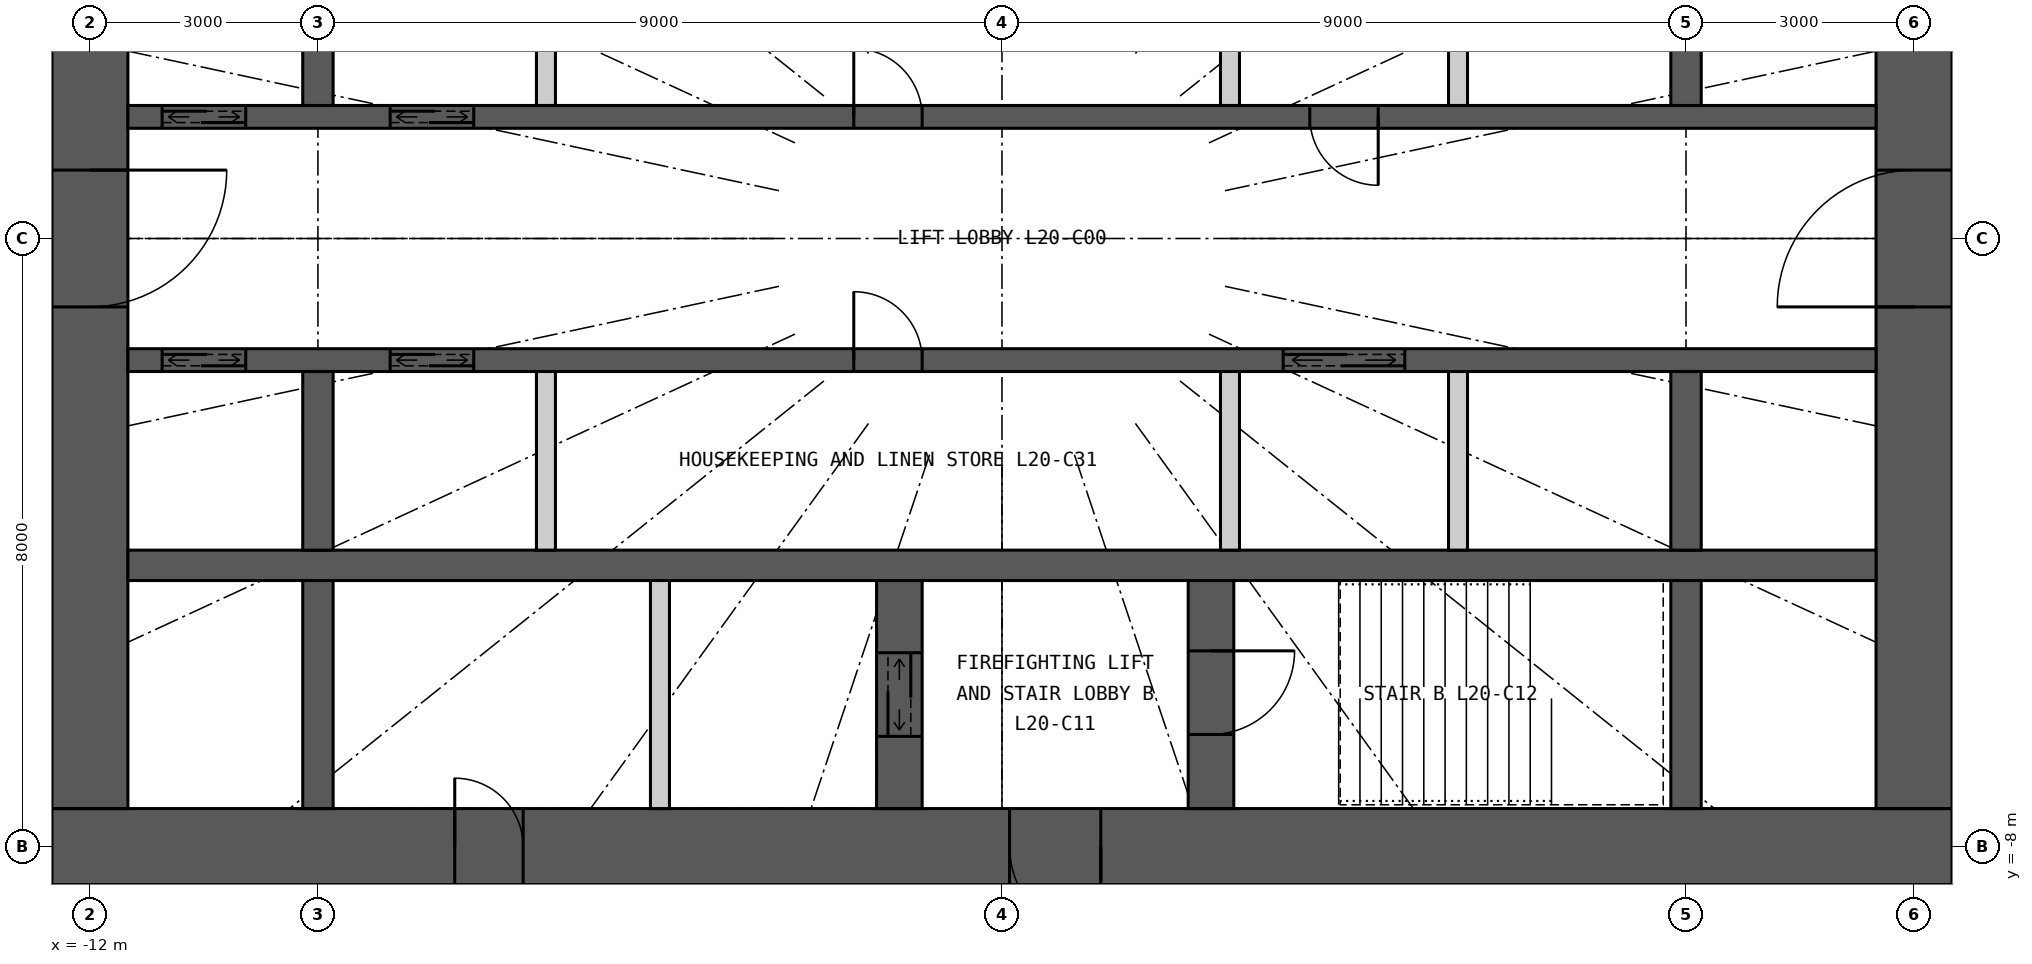
"""IFC4 building model, lengths in metres.
Left out: names, types, materials, properties, quantities, classifications, styles, units other than length and angle.
Written with IfcOpenShell. Run it as: python <this file> out.ifc"""

import sys

from ifc_helpers import new_model, si_unit, direction, frame, frame_2d, origin, place, context, subcontext, project, spatial, rectangle, extrude, element, fill, save


model = new_model("IFC4")
c1 = context("Model", 3, precision=1e-05, world=origin(), true_north=direction((0.0, 1.0)))
c2 = subcontext(c1, "Body", "Model", "MODEL_VIEW")
j1 = project(units=[si_unit("LENGTHUNIT", "METRE"), si_unit("PLANEANGLEUNIT", "RADIAN")], contexts=[c1])
p1 = place(None, origin())
s1 = spatial("IfcSite", under=j1, at=p1, CompositionType="ELEMENT")
p2 = place(p1, origin())
s2 = spatial("IfcBuilding", under=s1, at=p2, CompositionType="ELEMENT")
p3 = place(p2, frame((0.0, 0.0, 80.4)))
s3 = spatial("IfcBuildingStorey", under=s2, at=p3, CompositionType="ELEMENT", Elevation=80.4)
p4 = place(p3, frame((12.5, -8.0, 0.0), z_axis=(0.0, 0.0, 1.0), x_axis=(-1.0, 0.0, 0.0)))
e1 = element("IfcWall", 1, at=p4, inside=s3, PredefinedType="SHEAR", context=c2, shape_type="SweptSolid", body=[
    extrude(rectangle(XDim=25.0, YDim=1.0, at=frame_2d((12.5, 0.0))), origin(), (0.0, 0.0, 1.0), 3.3),
])
p5 = place(p4, frame((11.2, 0.0, 0.0)))
e2 = element("IfcOpeningElement", 2, at=p5, cuts=e1, PredefinedType="OPENING", context=c2, shape_type="SweptSolid", body=[
    extrude(rectangle(XDim=1.2, YDim=2.2, at=frame_2d((0.6, 1.1))), frame((0.0, 0.51, 0.0), z_axis=(0.0, -1.0, 0.0), x_axis=(1.0, 0.0, 0.0)), (0.0, 0.0, 1.0), 1.02),
])
p6 = place(p4, frame((18.8, 0.0, 0.0)))
e3 = element("IfcOpeningElement", 3, at=p6, cuts=e1, PredefinedType="OPENING", context=c2, shape_type="SweptSolid", body=[
    extrude(rectangle(XDim=0.9, YDim=2.2, at=frame_2d((0.45, 1.1))), frame((0.0, 0.51, 0.0), z_axis=(0.0, -1.0, 0.0), x_axis=(1.0, 0.0, 0.0)), (0.0, 0.0, 1.0), 1.02),
])
p7 = place(p3, frame((12.0, -7.5, 0.0), z_axis=(0.0, 0.0, 1.0), x_axis=(0.0, 1.0, 0.0)))
e4 = element("IfcWall", 4, at=p7, inside=s3, PredefinedType="SHEAR", context=c2, shape_type="SweptSolid", body=[
    extrude(rectangle(XDim=15.0, YDim=1.0, at=frame_2d((7.5, 0.0))), origin(), (0.0, 0.0, 1.0), 3.3),
])
p8 = place(p7, frame((6.6, 0.0, 0.0)))
e5 = element("IfcOpeningElement", 5, at=p8, cuts=e4, PredefinedType="OPENING", context=c2, shape_type="SweptSolid", body=[
    extrude(rectangle(XDim=1.8, YDim=2.2, at=frame_2d((0.9, 1.1))), frame((0.0, 0.51, 0.0), z_axis=(0.0, -1.0, 0.0), x_axis=(1.0, 0.0, 0.0)), (0.0, 0.0, 1.0), 1.02),
])
p9 = place(p3, frame((-12.0, 7.5, 0.0), z_axis=(0.0, 0.0, 1.0), x_axis=(0.0, -1.0, 0.0)))
e6 = element("IfcWall", 6, at=p9, inside=s3, PredefinedType="SHEAR", context=c2, shape_type="SweptSolid", body=[
    extrude(rectangle(XDim=15.0, YDim=1.0, at=frame_2d((7.5, 0.0))), origin(), (0.0, 0.0, 1.0), 3.3),
])
p10 = place(p9, frame((6.6, 0.0, 0.0)))
e7 = element("IfcOpeningElement", 7, at=p10, cuts=e6, PredefinedType="OPENING", context=c2, shape_type="SweptSolid", body=[
    extrude(rectangle(XDim=1.8, YDim=2.2, at=frame_2d((0.9, 1.1))), frame((0.0, 0.51, 0.0), z_axis=(0.0, -1.0, 0.0), x_axis=(1.0, 0.0, 0.0)), (0.0, 0.0, 1.0), 1.02),
])
p11 = place(p3, frame((-11.5, 1.6, 0.0), z_axis=(0.0, 0.0, 1.0), x_axis=(1.0, 0.0, 0.0)))
e8 = element("IfcWall", 8, at=p11, inside=s3, PredefinedType="SHEAR", context=c2, shape_type="SweptSolid", body=[
    extrude(rectangle(XDim=23.0, YDim=0.3, at=frame_2d((11.5, 0.0))), origin(), (0.0, 0.0, 1.0), 3.3),
])
p12 = place(p11, frame((0.45, 0.0, 0.0)))
e9 = element("IfcOpeningElement", 9, at=p12, cuts=e8, PredefinedType="OPENING", context=c2, shape_type="SweptSolid", body=[
    extrude(rectangle(XDim=1.1, YDim=2.2, at=frame_2d((0.55, 1.1))), frame((0.0, 0.16, 0.0), z_axis=(0.0, -1.0, 0.0), x_axis=(1.0, 0.0, 0.0)), (0.0, 0.0, 1.0), 0.32),
])
p13 = place(p11, frame((3.45, 0.0, 0.0)))
e10 = element("IfcOpeningElement", 10, at=p13, cuts=e8, PredefinedType="OPENING", context=c2, shape_type="SweptSolid", body=[
    extrude(rectangle(XDim=1.1, YDim=2.2, at=frame_2d((0.55, 1.1))), frame((0.0, 0.16, 0.0), z_axis=(0.0, -1.0, 0.0), x_axis=(1.0, 0.0, 0.0)), (0.0, 0.0, 1.0), 0.32),
])
p14 = place(p11, frame((9.55, 0.0, 0.0)))
e11 = element("IfcOpeningElement", 11, at=p14, cuts=e8, PredefinedType="OPENING", context=c2, shape_type="SweptSolid", body=[
    extrude(rectangle(XDim=0.9, YDim=2.2, at=frame_2d((0.45, 1.1))), frame((0.0, 0.16, 0.0), z_axis=(0.0, -1.0, 0.0), x_axis=(1.0, 0.0, 0.0)), (0.0, 0.0, 1.0), 0.32),
])
p15 = place(p11, frame((15.55, 0.0, 0.0)))
e12 = element("IfcOpeningElement", 12, at=p15, cuts=e8, PredefinedType="OPENING", context=c2, shape_type="SweptSolid", body=[
    extrude(rectangle(XDim=0.9, YDim=2.2, at=frame_2d((0.45, 1.1))), frame((0.0, 0.16, 0.0), z_axis=(0.0, -1.0, 0.0), x_axis=(1.0, 0.0, 0.0)), (0.0, 0.0, 1.0), 0.32),
])
p16 = place(p3, frame((-11.5, -4.3, 0.0), z_axis=(0.0, 0.0, 1.0), x_axis=(1.0, 0.0, 0.0)))
e13 = element("IfcWall", 13, at=p16, inside=s3, PredefinedType="SHEAR", context=c2, shape_type="SweptSolid", body=[
    extrude(rectangle(XDim=23.0, YDim=0.4, at=frame_2d((11.5, 0.0))), origin(), (0.0, 0.0, 1.0), 3.3),
])
p17 = place(p3, frame((-11.5, -1.6, 0.0), z_axis=(0.0, 0.0, 1.0), x_axis=(1.0, 0.0, 0.0)))
e14 = element("IfcWall", 14, at=p17, inside=s3, PredefinedType="SHEAR", context=c2, shape_type="SweptSolid", body=[
    extrude(rectangle(XDim=23.0, YDim=0.3, at=frame_2d((11.5, 0.0))), origin(), (0.0, 0.0, 1.0), 3.3),
])
p18 = place(p17, frame((0.45, 0.0, 0.0)))
e15 = element("IfcOpeningElement", 15, at=p18, cuts=e14, PredefinedType="OPENING", context=c2, shape_type="SweptSolid", body=[
    extrude(rectangle(XDim=1.1, YDim=2.2, at=frame_2d((0.55, 1.1))), frame((0.0, 0.16, 0.0), z_axis=(0.0, -1.0, 0.0), x_axis=(1.0, 0.0, 0.0)), (0.0, 0.0, 1.0), 0.32),
])
p19 = place(p17, frame((3.45, 0.0, 0.0)))
e16 = element("IfcOpeningElement", 16, at=p19, cuts=e14, PredefinedType="OPENING", context=c2, shape_type="SweptSolid", body=[
    extrude(rectangle(XDim=1.1, YDim=2.2, at=frame_2d((0.55, 1.1))), frame((0.0, 0.16, 0.0), z_axis=(0.0, -1.0, 0.0), x_axis=(1.0, 0.0, 0.0)), (0.0, 0.0, 1.0), 0.32),
])
p20 = place(p17, frame((15.2, 0.0, 0.0)))
e17 = element("IfcOpeningElement", 17, at=p20, cuts=e14, PredefinedType="OPENING", context=c2, shape_type="SweptSolid", body=[
    extrude(rectangle(XDim=1.6, YDim=2.4, at=frame_2d((0.8, 1.2))), frame((0.0, 0.16, 0.0), z_axis=(0.0, -1.0, 0.0), x_axis=(1.0, 0.0, 0.0)), (0.0, 0.0, 1.0), 0.32),
])
p21 = place(p17, frame((9.55, 0.0, 0.0)))
e18 = element("IfcOpeningElement", 18, at=p21, cuts=e14, PredefinedType="OPENING", context=c2, shape_type="SweptSolid", body=[
    extrude(rectangle(XDim=0.9, YDim=2.2, at=frame_2d((0.45, 1.1))), frame((0.0, 0.16, 0.0), z_axis=(0.0, -1.0, 0.0), x_axis=(1.0, 0.0, 0.0)), (0.0, 0.0, 1.0), 0.32),
])
for number, where, z_axis, x_axis in (
    (19, (-9.0, 1.75, 0.0), (0.0, 0.0, 1.0), (0.0, 1.0, 0.0)),
    (20, (-9.0, -4.1, 0.0), (0.0, 0.0, 1.0), (0.0, 1.0, 0.0)),
):
    element("IfcWall", number, at=place(p3, frame(where, z_axis=z_axis, x_axis=x_axis)), inside=s3, PredefinedType="SHEAR", context=c2, shape_type="SweptSolid", body=[
        extrude(rectangle(XDim=2.35, YDim=0.4, at=frame_2d((1.175, 0.0))), origin(), (0.0, 0.0, 1.0), 3.3),
    ])
p22 = place(p3, frame((-9.0, -7.5, 0.0), z_axis=(0.0, 0.0, 1.0), x_axis=(0.0, 1.0, 0.0)))
e21 = element("IfcWall", 21, at=p22, inside=s3, PredefinedType="SHEAR", context=c2, shape_type="SweptSolid", body=[
    extrude(rectangle(XDim=3.0, YDim=0.4, at=frame_2d((1.5, 0.0))), origin(), (0.0, 0.0, 1.0), 3.3),
])
for number, where, z_axis, x_axis in (
    (22, (9.0, 1.75, 0.0), (0.0, 0.0, 1.0), (0.0, 1.0, 0.0)),
    (23, (9.0, -4.1, 0.0), (0.0, 0.0, 1.0), (0.0, 1.0, 0.0)),
):
    element("IfcWall", number, at=place(p3, frame(where, z_axis=z_axis, x_axis=x_axis)), inside=s3, PredefinedType="SHEAR", context=c2, shape_type="SweptSolid", body=[
        extrude(rectangle(XDim=2.35, YDim=0.4, at=frame_2d((1.175, 0.0))), origin(), (0.0, 0.0, 1.0), 3.3),
    ])
p23 = place(p3, frame((9.0, -7.5, 0.0), z_axis=(0.0, 0.0, 1.0), x_axis=(0.0, 1.0, 0.0)))
e24 = element("IfcWall", 24, at=p23, inside=s3, PredefinedType="SHEAR", context=c2, shape_type="SweptSolid", body=[
    extrude(rectangle(XDim=3.0, YDim=0.4, at=frame_2d((1.5, 0.0))), origin(), (0.0, 0.0, 1.0), 3.3),
])
p24 = place(p3, frame((2.75, -7.5, 0.0), z_axis=(0.0, 0.0, 1.0), x_axis=(0.0, 1.0, 0.0)))
e25 = element("IfcWall", 25, at=p24, inside=s3, PredefinedType="SHEAR", context=c2, shape_type="SweptSolid", body=[
    extrude(rectangle(XDim=3.0, YDim=0.6, at=frame_2d((1.5, 0.0))), origin(), (0.0, 0.0, 1.0), 3.3),
])
p25 = place(p24, frame((0.975, 0.0, 0.0)))
e26 = element("IfcOpeningElement", 26, at=p25, cuts=e25, PredefinedType="OPENING", context=c2, shape_type="SweptSolid", body=[
    extrude(rectangle(XDim=1.1, YDim=2.2, at=frame_2d((0.55, 1.1))), frame((0.0, 0.31, 0.0), z_axis=(0.0, -1.0, 0.0), x_axis=(1.0, 0.0, 0.0)), (0.0, 0.0, 1.0), 0.62),
])
p26 = place(p3, frame((-1.35, -7.5, 0.0), z_axis=(0.0, 0.0, 1.0), x_axis=(0.0, 1.0, 0.0)))
e27 = element("IfcWall", 27, at=p26, inside=s3, PredefinedType="SHEAR", context=c2, shape_type="SweptSolid", body=[
    extrude(rectangle(XDim=3.0, YDim=0.6, at=frame_2d((1.5, 0.0))), origin(), (0.0, 0.0, 1.0), 3.3),
])
p27 = place(p26, frame((0.95, 0.0, 0.0)))
e28 = element("IfcOpeningElement", 28, at=p27, cuts=e27, PredefinedType="OPENING", context=c2, shape_type="SweptSolid", body=[
    extrude(rectangle(XDim=1.1, YDim=2.2, at=frame_2d((0.55, 1.1))), frame((0.0, 0.31, 0.0), z_axis=(0.0, -1.0, 0.0), x_axis=(1.0, 0.0, 0.0)), (0.0, 0.0, 1.0), 0.62),
])
p28 = place(p3, frame((-4.5, -7.5, 0.0), z_axis=(0.0, 0.0, 1.0), x_axis=(0.0, 1.0, 0.0)))
e29 = element("IfcWall", 29, at=p28, inside=s3, PredefinedType="PARTITIONING", context=c2, shape_type="SweptSolid", body=[
    extrude(rectangle(XDim=3.0, YDim=0.25, at=frame_2d((1.5, 0.0))), origin(), (0.0, 0.0, 1.0), 3.3),
])
for number, where, z_axis, x_axis in (
    (30, (-6.0, 1.75, 0.0), (0.0, 0.0, 1.0), (0.0, 1.0, 0.0)),
    (31, (3.0, 1.75, 0.0), (0.0, 0.0, 1.0), (0.0, 1.0, 0.0)),
    (32, (6.0, 1.75, 0.0), (0.0, 0.0, 1.0), (0.0, 1.0, 0.0)),
    (33, (-6.0, -4.1, 0.0), (0.0, 0.0, 1.0), (0.0, 1.0, 0.0)),
    (34, (3.0, -4.1, 0.0), (0.0, 0.0, 1.0), (0.0, 1.0, 0.0)),
    (35, (6.0, -4.1, 0.0), (0.0, 0.0, 1.0), (0.0, 1.0, 0.0)),
):
    element("IfcWall", number, at=place(p3, frame(where, z_axis=z_axis, x_axis=x_axis)), inside=s3, PredefinedType="PARTITIONING", context=c2, shape_type="SweptSolid", body=[
        extrude(rectangle(XDim=2.35, YDim=0.25, at=frame_2d((1.175, 0.0))), origin(), (0.0, 0.0, 1.0), 3.3),
    ])
p29 = place(p5, origin())
e36 = element("IfcDoor", 36, at=p29, inside=s3, OperationType="SINGLE_SWING_LEFT", PredefinedType="DOOR", context=c2, shape_type="SweptSolid", body=[
    extrude(rectangle(XDim=1.2, YDim=2.2, at=frame_2d((0.6, 1.1))), frame((0.0, 0.025, 0.0), z_axis=(0.0, -1.0, 0.0), x_axis=(1.0, 0.0, 0.0)), (0.0, 0.0, 1.0), 0.05),
])
fill(e2, e36)
p30 = place(p25, origin())
e37 = element("IfcDoor", 37, at=p30, inside=s3, OperationType="SINGLE_SWING_RIGHT", PredefinedType="DOOR", context=c2, shape_type="SweptSolid", body=[
    extrude(rectangle(XDim=1.1, YDim=2.2, at=frame_2d((0.55, 1.1))), frame((0.0, 0.025, 0.0), z_axis=(0.0, -1.0, 0.0), x_axis=(1.0, 0.0, 0.0)), (0.0, 0.0, 1.0), 0.05),
])
fill(e26, e37)
p31 = place(p27, origin())
e38 = element("IfcDoor", 38, at=p31, inside=s3, OperationType="DOUBLE_DOOR_SLIDING", PredefinedType="DOOR", context=c2, shape_type="SweptSolid", body=[
    extrude(rectangle(XDim=1.1, YDim=2.2, at=frame_2d((0.55, 1.1))), frame((0.0, 0.025, 0.0), z_axis=(0.0, -1.0, 0.0), x_axis=(1.0, 0.0, 0.0)), (0.0, 0.0, 1.0), 0.05),
])
fill(e28, e38)
p32 = place(p6, origin())
e39 = element("IfcDoor", 39, at=p32, inside=s3, OperationType="SINGLE_SWING_RIGHT", PredefinedType="DOOR", context=c2, shape_type="SweptSolid", body=[
    extrude(rectangle(XDim=0.9, YDim=2.2, at=frame_2d((0.45, 1.1))), frame((0.0, 0.025, 0.0), z_axis=(0.0, -1.0, 0.0), x_axis=(1.0, 0.0, 0.0)), (0.0, 0.0, 1.0), 0.05),
])
fill(e3, e39)
p33 = place(p12, origin())
e40 = element("IfcDoor", 40, at=p33, inside=s3, OperationType="DOUBLE_DOOR_SLIDING", PredefinedType="DOOR", context=c2, shape_type="SweptSolid", body=[
    extrude(rectangle(XDim=1.1, YDim=2.2, at=frame_2d((0.55, 1.1))), frame((0.0, 0.025, 0.0), z_axis=(0.0, -1.0, 0.0), x_axis=(1.0, 0.0, 0.0)), (0.0, 0.0, 1.0), 0.05),
])
fill(e9, e40)
p34 = place(p13, origin())
e41 = element("IfcDoor", 41, at=p34, inside=s3, OperationType="DOUBLE_DOOR_SLIDING", PredefinedType="DOOR", context=c2, shape_type="SweptSolid", body=[
    extrude(rectangle(XDim=1.1, YDim=2.2, at=frame_2d((0.55, 1.1))), frame((0.0, 0.025, 0.0), z_axis=(0.0, -1.0, 0.0), x_axis=(1.0, 0.0, 0.0)), (0.0, 0.0, 1.0), 0.05),
])
fill(e10, e41)
p35 = place(p18, origin())
e42 = element("IfcDoor", 42, at=p35, inside=s3, OperationType="DOUBLE_DOOR_SLIDING", PredefinedType="DOOR", context=c2, shape_type="SweptSolid", body=[
    extrude(rectangle(XDim=1.1, YDim=2.2, at=frame_2d((0.55, 1.1))), frame((0.0, 0.025, 0.0), z_axis=(0.0, -1.0, 0.0), x_axis=(1.0, 0.0, 0.0)), (0.0, 0.0, 1.0), 0.05),
])
fill(e15, e42)
p36 = place(p19, origin())
e43 = element("IfcDoor", 43, at=p36, inside=s3, OperationType="DOUBLE_DOOR_SLIDING", PredefinedType="DOOR", context=c2, shape_type="SweptSolid", body=[
    extrude(rectangle(XDim=1.1, YDim=2.2, at=frame_2d((0.55, 1.1))), frame((0.0, 0.025, 0.0), z_axis=(0.0, -1.0, 0.0), x_axis=(1.0, 0.0, 0.0)), (0.0, 0.0, 1.0), 0.05),
])
fill(e16, e43)
p37 = place(p20, origin())
e44 = element("IfcDoor", 44, at=p37, inside=s3, OperationType="DOUBLE_DOOR_SLIDING", PredefinedType="DOOR", context=c2, shape_type="SweptSolid", body=[
    extrude(rectangle(XDim=1.6, YDim=2.4, at=frame_2d((0.8, 1.2))), frame((0.0, 0.025, 0.0), z_axis=(0.0, -1.0, 0.0), x_axis=(1.0, 0.0, 0.0)), (0.0, 0.0, 1.0), 0.05),
])
fill(e17, e44)
p38 = place(p14, origin())
e45 = element("IfcDoor", 45, at=p38, inside=s3, OperationType="SINGLE_SWING_LEFT", PredefinedType="DOOR", context=c2, shape_type="SweptSolid", body=[
    extrude(rectangle(XDim=0.9, YDim=2.2, at=frame_2d((0.45, 1.1))), frame((0.0, 0.025, 0.0), z_axis=(0.0, -1.0, 0.0), x_axis=(1.0, 0.0, 0.0)), (0.0, 0.0, 1.0), 0.05),
])
fill(e11, e45)
p39 = place(p15, origin())
e46 = element("IfcDoor", 46, at=p39, inside=s3, OperationType="SINGLE_SWING_RIGHT", PredefinedType="DOOR", context=c2, shape_type="SweptSolid", body=[
    extrude(rectangle(XDim=0.9, YDim=2.2, at=frame_2d((0.45, 1.1))), frame((0.0, 0.025, 0.0), z_axis=(0.0, -1.0, 0.0), x_axis=(1.0, 0.0, 0.0)), (0.0, 0.0, 1.0), 0.05),
])
fill(e12, e46)
p40 = place(p21, origin())
e47 = element("IfcDoor", 47, at=p40, inside=s3, OperationType="SINGLE_SWING_LEFT", PredefinedType="DOOR", context=c2, shape_type="SweptSolid", body=[
    extrude(rectangle(XDim=0.9, YDim=2.2, at=frame_2d((0.45, 1.1))), frame((0.0, 0.025, 0.0), z_axis=(0.0, -1.0, 0.0), x_axis=(1.0, 0.0, 0.0)), (0.0, 0.0, 1.0), 0.05),
])
fill(e18, e47)
p41 = place(p8, origin())
e48 = element("IfcDoor", 48, at=p41, inside=s3, OperationType="DOUBLE_DOOR_DOUBLE_SWING", PredefinedType="DOOR", context=c2, shape_type="SweptSolid", body=[
    extrude(rectangle(XDim=1.8, YDim=2.2, at=frame_2d((0.9, 1.1))), frame((0.0, 0.025, 0.0), z_axis=(0.0, -1.0, 0.0), x_axis=(1.0, 0.0, 0.0)), (0.0, 0.0, 1.0), 0.05),
])
fill(e5, e48)
p42 = place(p10, origin())
e49 = element("IfcDoor", 49, at=p42, inside=s3, OperationType="DOUBLE_DOOR_DOUBLE_SWING", PredefinedType="DOOR", context=c2, shape_type="SweptSolid", body=[
    extrude(rectangle(XDim=1.8, YDim=2.2, at=frame_2d((0.9, 1.1))), frame((0.0, 0.025, 0.0), z_axis=(0.0, -1.0, 0.0), x_axis=(1.0, 0.0, 0.0)), (0.0, 0.0, 1.0), 0.05),
])
fill(e7, e49)
save(model, sys.argv[1])
